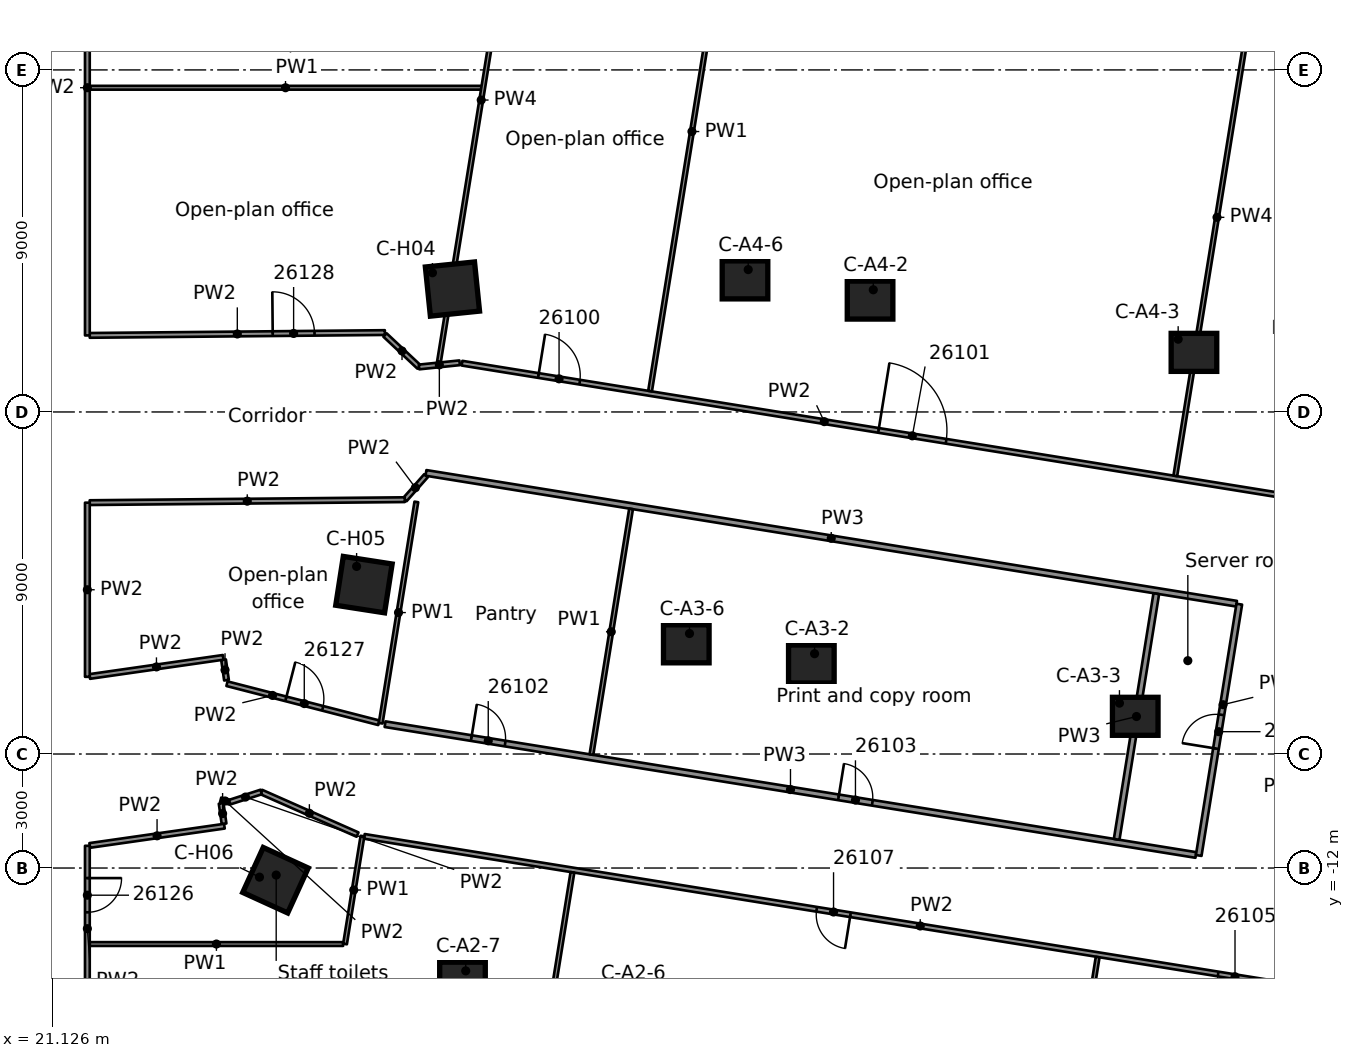
"""IFC4 building model, lengths in metres.
Left out: names, types, materials, properties, quantities, classifications, styles, units other than length and angle.
Written with IfcOpenShell. Run it as: python <this file> out.ifc"""

import sys

from ifc_helpers import new_model, si_unit, direction, frame, frame_2d, origin, origin_2d, place, context, subcontext, project, spatial, rectangle, extrude, element, fill, save


model = new_model("IFC4")
c1 = context("Model", 3, precision=1e-05, world=origin(), true_north=direction((0.0, 1.0)))
c2 = subcontext(c1, "Body", "Model", "MODEL_VIEW")
j1 = project(units=[si_unit("LENGTHUNIT", "METRE"), si_unit("PLANEANGLEUNIT", "RADIAN")], contexts=[c1])
p1 = place(None, origin())
s1 = spatial("IfcSite", under=j1, at=p1, CompositionType="ELEMENT")
p2 = place(p1, origin())
s2 = spatial("IfcBuilding", under=s1, at=p2, CompositionType="ELEMENT")
p3 = place(p2, frame((0.0, 0.0, 134.2)))
s3 = spatial("IfcBuildingStorey", under=s2, at=p3, CompositionType="ELEMENT", Elevation=134.2)
for number, where, z_axis, x_axis in (
    (1, (31.922, -14.977, 0.0), (0.0, 0.0, 1.0), (1.0, 0.0, 0.0)),
    (2, (41.102, -6.632, 0.0), (0.0, 0.0, 1.0), (1.0, 0.0, 0.0)),
    (3, (49.625, -8.008, 0.0), (0.0, 0.0, 1.0), (1.0, 0.0, 0.0)),
    (4, (37.811, -6.101, 0.0), (0.0, 0.0, 1.0), (1.0, 0.0, 0.0)),
    (5, (42.647, 2.944, 0.0), (0.0, 0.0, 1.0), (1.0, 0.0, 0.0)),
    (6, (51.17, 1.568, 0.0), (0.0, 0.0, 1.0), (1.0, 0.0, 0.0)),
    (7, (39.356, 3.475, 0.0), (0.0, 0.0, 1.0), (1.0, 0.0, 0.0)),
):
    element("IfcColumn", number, at=place(p3, frame(where, z_axis=z_axis, x_axis=x_axis)), inside=s3, PredefinedType="COLUMN", context=c2, shape_type="SweptSolid", body=[
        extrude(rectangle(XDim=1.2, YDim=1.0, at=origin_2d()), origin(), (0.0, 0.0, 1.0), 3.5),
    ])
for number, where, z_axis, x_axis in (
    (8, (31.658, 3.234, 0.0), (0.0, 0.0, 1.0), (0.995, 0.102, 0.0)),
    (9, (29.329, -4.543, 0.0), (0.0, 0.0, 1.0), (0.988, -0.153, 0.0)),
    (10, (27.001, -12.321, 0.0), (0.0, 0.0, 1.0), (0.91, -0.415, 0.0)),
):
    element("IfcColumn", number, at=place(p3, frame(where, z_axis=z_axis, x_axis=x_axis)), inside=s3, PredefinedType="COLUMN", context=c2, shape_type="SweptSolid", body=[
        extrude(rectangle(XDim=1.3, YDim=1.3, at=origin_2d()), origin(), (0.0, 0.0, 1.0), 3.5),
    ])
p4 = place(p3, frame((29.883, 2.025, 0.0), z_axis=(0.0, 0.0, 1.0), x_axis=(0.729202519841, -0.684297950499, 0.0)))
e11 = element("IfcWall", 11, at=p4, inside=s3, PredefinedType="PARTITIONING", context=c2, shape_type="SweptSolid", body=[
    extrude(rectangle(XDim=1.229, YDim=0.125, at=frame_2d((0.614, 0.0))), origin(), (0.0, 0.0, 1.0), 3.03),
])
p5 = place(p3, frame((30.962, -1.678, 0.0), z_axis=(0.0, 0.0, 1.0), x_axis=(-0.66286801914, -0.748736261444, 0.0)))
e12 = element("IfcWall", 12, at=p5, inside=s3, PredefinedType="PARTITIONING", context=c2, shape_type="SweptSolid", body=[
    extrude(rectangle(XDim=0.842, YDim=0.125, at=frame_2d((0.421, 0.0))), origin(), (0.0, 0.0, 1.0), 3.03),
])
for number, where, z_axis, x_axis in (
    (13, (25.571, -10.299, 0.0), (0.0, 0.0, 1.0), (0.142, -0.99, 0.0)),
    (14, (25.635, -6.52, 0.0), (0.0, 0.0, 1.0), (0.142, -0.99, 0.0)),
):
    element("IfcWall", number, at=place(p3, frame(where, z_axis=z_axis, x_axis=x_axis)), inside=s3, PredefinedType="PARTITIONING", context=c2, shape_type="SweptSolid", body=[
        extrude(rectangle(XDim=0.542, YDim=0.125, at=frame_2d((0.271, 0.0))), origin(), (0.0, 0.0, 1.0), 3.03),
    ])
p6 = place(p3, frame((26.626, -9.999, 0.0), z_axis=(0.0, 0.0, 1.0), x_axis=(0.914493335472, -0.404600963145, 0.0)))
e15 = element("IfcWall", 15, at=p6, inside=s3, PredefinedType="PARTITIONING", context=c2, shape_type="SweptSolid", body=[
    extrude(rectangle(XDim=2.771, YDim=0.125, at=frame_2d((1.385, 0.0))), origin(), (0.0, 0.0, 1.0), 3.03),
])
p7 = place(p3, frame((25.558, -10.206, 0.0), z_axis=(0.0, 0.0, 1.0), x_axis=(0.968355193071, -0.249576080688, 0.0)))
e16 = element("IfcWall", 16, at=p7, inside=s3, PredefinedType="PARTITIONING", context=c2, shape_type="SweptSolid", body=[
    extrude(rectangle(XDim=0.245, YDim=0.125, at=frame_2d((0.122, 0.0))), origin(), (0.0, 0.0, 1.0), 3.03),
])
p8 = place(p3, frame((25.725, -7.15, 0.0), z_axis=(0.0, 0.0, 1.0), x_axis=(0.968459487002, -0.249171069821, 0.0)))
e17 = element("IfcWall", 17, at=p8, inside=s3, PredefinedType="PARTITIONING", context=c2, shape_type="SweptSolid", body=[
    extrude(rectangle(XDim=4.126, YDim=0.125, at=frame_2d((2.063, 0.0))), origin(), (0.0, 0.0, 1.0), 3.03),
])
p9 = place(p8, frame((1.6, 0.0, 0.0)))
e18 = element("IfcOpeningElement", 18, at=p9, cuts=e17, PredefinedType="OPENING", context=c2, shape_type="SweptSolid", body=[
    extrude(rectangle(XDim=1.0, YDim=2.1, at=frame_2d((0.5, 1.05))), frame((0.0, 0.073, 0.0), z_axis=(0.0, -1.0, 0.0), x_axis=(1.0, 0.0, 0.0)), (0.0, 0.0, 1.0), 0.145),
])
p10 = place(p3, frame((53.72, -15.097, 0.0), z_axis=(0.0, 0.0, 1.0), x_axis=(-0.987256807208, 0.159135152063, 0.0)))
e19 = element("IfcWall", 19, at=p10, inside=s3, PredefinedType="PARTITIONING", context=c2, shape_type="SweptSolid", body=[
    extrude(rectangle(XDim=24.696, YDim=0.125, at=frame_2d((12.348, 0.0))), origin(), (0.0, 0.0, 1.0), 3.03),
])
p11 = place(p10, frame((1.039, 0.0, 0.0)))
e20 = element("IfcOpeningElement", 20, at=p11, cuts=e19, PredefinedType="OPENING", context=c2, shape_type="SweptSolid", body=[
    extrude(rectangle(XDim=0.9, YDim=2.1, at=frame_2d((0.45, 1.05))), frame((0.0, 0.073, 0.0), z_axis=(0.0, -1.0, 0.0), x_axis=(1.0, 0.0, 0.0)), (0.0, 0.0, 1.0), 0.145),
])
p12 = place(p10, frame((11.739, 0.0, 0.0)))
e21 = element("IfcOpeningElement", 21, at=p12, cuts=e19, PredefinedType="OPENING", context=c2, shape_type="SweptSolid", body=[
    extrude(rectangle(XDim=0.9, YDim=2.1, at=frame_2d((0.45, 1.05))), frame((0.0, 0.073, 0.0), z_axis=(0.0, -1.0, 0.0), x_axis=(1.0, 0.0, 0.0)), (0.0, 0.0, 1.0), 0.145),
])
p13 = place(p3, frame((29.885, -8.215, 0.0), z_axis=(0.0, 0.0, 1.0), x_axis=(0.987236652076, -0.1592601419, 0.0)))
e22 = element("IfcWall", 22, at=p13, inside=s3, PredefinedType="PARTITIONING", context=c2, shape_type="SweptSolid", body=[
    extrude(rectangle(XDim=21.612, YDim=0.15, at=frame_2d((10.806, 0.0))), origin(), (0.0, 0.0, 1.0), 3.03),
])
p14 = place(p13, frame((2.3, 0.0, 0.0)))
e23 = element("IfcOpeningElement", 23, at=p14, cuts=e22, PredefinedType="OPENING", context=c2, shape_type="SweptSolid", body=[
    extrude(rectangle(XDim=0.9, YDim=2.1, at=frame_2d((0.45, 1.05))), frame((0.0, 0.085, 0.0), z_axis=(0.0, -1.0, 0.0), x_axis=(1.0, 0.0, 0.0)), (0.0, 0.0, 1.0), 0.17),
])
p15 = place(p13, frame((12.088, 0.0, 0.0)))
e24 = element("IfcOpeningElement", 24, at=p15, cuts=e22, PredefinedType="OPENING", context=c2, shape_type="SweptSolid", body=[
    extrude(rectangle(XDim=0.9, YDim=2.1, at=frame_2d((0.45, 1.05))), frame((0.0, 0.085, 0.0), z_axis=(0.0, -1.0, 0.0), x_axis=(1.0, 0.0, 0.0)), (0.0, 0.0, 1.0), 0.17),
])
p16 = place(p3, frame((30.961, -1.603, 0.0), z_axis=(0.0, 0.0, 1.0), x_axis=(0.987228625593, -0.159309889241, 0.0)))
e25 = element("IfcWall", 25, at=p16, inside=s3, PredefinedType="PARTITIONING", context=c2, shape_type="SweptSolid", body=[
    extrude(rectangle(XDim=21.605, YDim=0.15, at=frame_2d((10.802, 0.0))), origin(), (0.0, 0.0, 1.0), 3.03),
])
p17 = place(p3, frame((31.909, 1.284, 0.0), z_axis=(0.0, 0.0, 1.0), x_axis=(0.987227629246, -0.159316063386, 0.0)))
e26 = element("IfcWall", 26, at=p17, inside=s3, PredefinedType="PARTITIONING", context=c2, shape_type="SweptSolid", body=[
    extrude(rectangle(XDim=24.14, YDim=0.125, at=frame_2d((12.07, 0.0))), origin(), (0.0, 0.0, 1.0), 3.03),
])
p18 = place(p17, frame((2.038, 0.0, 0.0)))
e27 = element("IfcOpeningElement", 27, at=p18, cuts=e26, PredefinedType="OPENING", context=c2, shape_type="SweptSolid", body=[
    extrude(rectangle(XDim=1.1, YDim=2.1, at=frame_2d((0.55, 1.05))), frame((0.0, 0.073, 0.0), z_axis=(0.0, -1.0, 0.0), x_axis=(1.0, 0.0, 0.0)), (0.0, 0.0, 1.0), 0.145),
])
p19 = place(p17, frame((11.103, 0.0, 0.0)))
e28 = element("IfcOpeningElement", 28, at=p19, cuts=e26, PredefinedType="OPENING", context=c2, shape_type="SweptSolid", body=[
    extrude(rectangle(XDim=1.8, YDim=2.1, at=frame_2d((0.9, 1.05))), frame((0.0, 0.073, 0.0), z_axis=(0.0, -1.0, 0.0), x_axis=(1.0, 0.0, 0.0)), (0.0, 0.0, 1.0), 0.145),
])
p20 = place(p17, frame((22.303, 0.0, 0.0)))
e29 = element("IfcOpeningElement", 29, at=p20, cuts=e26, PredefinedType="OPENING", context=c2, shape_type="SweptSolid", body=[
    extrude(rectangle(XDim=0.9, YDim=2.1, at=frame_2d((0.45, 1.05))), frame((0.0, 0.073, 0.0), z_axis=(0.0, -1.0, 0.0), x_axis=(1.0, 0.0, 0.0)), (0.0, 0.0, 1.0), 0.145),
])
p21 = place(p3, frame((22.113, -14.0, 0.0), z_axis=(0.0, 0.0, 1.0), x_axis=(1.0, 0.0, 0.0)))
e30 = element("IfcWall", 30, at=p21, inside=s3, PredefinedType="PARTITIONING", context=c2, shape_type="SweptSolid", body=[
    extrude(rectangle(XDim=6.668, YDim=0.1, at=frame_2d((3.334, 0.0))), origin(), (0.0, 0.0, 1.0), 3.03),
])
p22 = place(p3, frame((22.113, 8.531, 0.0), z_axis=(0.0, 0.0, 1.0), x_axis=(1.0, 0.0, 0.0)))
e31 = element("IfcWall", 31, at=p22, inside=s3, PredefinedType="PARTITIONING", context=c2, shape_type="SweptSolid", body=[
    extrude(rectangle(XDim=10.304, YDim=0.1, at=frame_2d((5.152, 0.0))), origin(), (0.0, 0.0, 1.0), 3.03),
])
p23 = place(p3, frame((22.113, -2.386, 0.0), z_axis=(0.0, 0.0, 1.0), x_axis=(0.9999558849, 0.009392989614, 0.0)))
e32 = element("IfcWall", 32, at=p23, inside=s3, PredefinedType="PARTITIONING", context=c2, shape_type="SweptSolid", body=[
    extrude(rectangle(XDim=8.291, YDim=0.125, at=frame_2d((4.146, 0.0))), origin(), (0.0, 0.0, 1.0), 3.03),
])
p24 = place(p3, frame((22.113, 2.015, 0.0), z_axis=(0.0, 0.0, 1.0), x_axis=(0.999954346069, 0.00955540569, 0.0)))
e33 = element("IfcWall", 33, at=p24, inside=s3, PredefinedType="PARTITIONING", context=c2, shape_type="SweptSolid", body=[
    extrude(rectangle(XDim=7.767, YDim=0.125, at=frame_2d((3.884, 0.0))), origin(), (0.0, 0.0, 1.0), 3.03),
])
p25 = place(p24, frame((4.816, 0.0, 0.0)))
e34 = element("IfcOpeningElement", 34, at=p25, cuts=e33, PredefinedType="OPENING", context=c2, shape_type="SweptSolid", body=[
    extrude(rectangle(XDim=1.1, YDim=2.1, at=frame_2d((0.55, 1.05))), frame((0.0, 0.073, 0.0), z_axis=(0.0, -1.0, 0.0), x_axis=(1.0, 0.0, 0.0)), (0.0, 0.0, 1.0), 0.145),
])
p26 = place(p3, frame((31.847, 1.294, 0.0), z_axis=(0.0, 0.0, 1.0), x_axis=(-0.994749429213, -0.102340476256, 0.0)))
e35 = element("IfcWall", 35, at=p26, inside=s3, PredefinedType="PARTITIONING", context=c2, shape_type="SweptSolid", body=[
    extrude(rectangle(XDim=1.073, YDim=0.125, at=frame_2d((0.537, 0.0))), origin(), (0.0, 0.0, 1.0), 3.03),
])
p27 = place(p3, frame((25.657, -10.899, 0.0), z_axis=(0.0, 0.0, 1.0), x_axis=(-0.989918099623, -0.141640940543, 0.0)))
e36 = element("IfcWall", 36, at=p27, inside=s3, PredefinedType="PARTITIONING", context=c2, shape_type="SweptSolid", body=[
    extrude(rectangle(XDim=3.58, YDim=0.125, at=frame_2d((1.79, 0.0))), origin(), (0.0, 0.0, 1.0), 3.03),
])
p28 = place(p3, frame((22.113, -6.96, 0.0), z_axis=(0.0, 0.0, 1.0), x_axis=(0.989901265857, 0.141758540679, 0.0)))
e37 = element("IfcWall", 37, at=p28, inside=s3, PredefinedType="PARTITIONING", context=c2, shape_type="SweptSolid", body=[
    extrude(rectangle(XDim=3.548, YDim=0.125, at=frame_2d((1.774, 0.0))), origin(), (0.0, 0.0, 1.0), 3.03),
])
p29 = place(p3, frame((25.796, -10.267, 0.0), z_axis=(0.0, 0.0, 1.0), x_axis=(0.951608325535, 0.307313512187, 0.0)))
e38 = element("IfcWall", 38, at=p29, inside=s3, PredefinedType="PARTITIONING", context=c2, shape_type="SweptSolid", body=[
    extrude(rectangle(XDim=0.872, YDim=0.125, at=frame_2d((0.436, 0.0))), origin(), (0.0, 0.0, 1.0), 3.03),
])
p30 = place(p3, frame((51.295, -11.67, 0.0), z_axis=(0.0, 0.0, 1.0), x_axis=(0.159450148398, 0.987205981635, 0.0)))
e39 = element("IfcWall", 39, at=p30, inside=s3, PredefinedType="PARTITIONING", context=c2, shape_type="SweptSolid", body=[
    extrude(rectangle(XDim=6.699, YDim=0.15, at=frame_2d((3.349, 0.0))), origin(), (0.0, 0.0, 1.0), 2.419),
])
p31 = place(p30, frame((2.85, 0.0, 0.0)))
e40 = element("IfcOpeningElement", 40, at=p31, cuts=e39, PredefinedType="OPENING", context=c2, shape_type="SweptSolid", body=[
    extrude(rectangle(XDim=0.9, YDim=2.1, at=frame_2d((0.45, 1.05))), frame((0.0, 0.085, 0.0), z_axis=(0.0, -1.0, 0.0), x_axis=(1.0, 0.0, 0.0)), (0.0, 0.0, 1.0), 0.17),
])
p32 = place(p3, frame((46.44, -27.951, 0.0), z_axis=(0.0, 0.0, 1.0), x_axis=(0.159329896372, 0.987225396818, 0.0)))
e41 = element("IfcWall", 41, at=p32, inside=s3, PredefinedType="PARTITIONING", context=c2, shape_type="SweptSolid", body=[
    extrude(rectangle(XDim=13.783, YDim=0.1, at=frame_2d((6.892, 0.0))), origin(), (0.0, 0.0, 1.0), 3.03),
])
p33 = place(p3, frame((49.136, -11.246, 0.0), z_axis=(0.0, 0.0, 1.0), x_axis=(0.159264085933, 0.98723601582, 0.0)))
e42 = element("IfcWall", 42, at=p33, inside=s3, PredefinedType="PARTITIONING", context=c2, shape_type="SweptSolid", body=[
    extrude(rectangle(XDim=6.549, YDim=0.15, at=frame_2d((3.274, 0.0))), origin(), (0.0, 0.0, 1.0), 3.03),
])
p34 = place(p3, frame((50.679, -1.682, 0.0), z_axis=(0.0, 0.0, 1.0), x_axis=(0.159341041875, 0.987223597963, 0.0)))
e43 = element("IfcWall", 43, at=p34, inside=s3, PredefinedType="PARTITIONING", context=c2, shape_type="SweptSolid", body=[
    extrude(rectangle(XDim=13.782, YDim=0.1, at=frame_2d((6.891, 0.0))), origin(), (0.0, 0.0, 1.0), 2.395),
])
p35 = place(p3, frame((32.61, -25.774, 0.0), z_axis=(0.0, 0.0, 1.0), x_axis=(0.159346714874, 0.987222682306, 0.0)))
e44 = element("IfcWall", 44, at=p35, inside=s3, PredefinedType="PARTITIONING", context=c2, shape_type="SweptSolid", body=[
    extrude(rectangle(XDim=13.837, YDim=0.1, at=frame_2d((6.918, 0.0))), origin(), (0.0, 0.0, 1.0), 3.03),
])
p36 = place(p3, frame((35.315, -9.015, 0.0), z_axis=(0.0, 0.0, 1.0), x_axis=(0.159269947871, 0.987235070135, 0.0)))
e45 = element("IfcWall", 45, at=p36, inside=s3, PredefinedType="PARTITIONING", context=c2, shape_type="SweptSolid", body=[
    extrude(rectangle(XDim=6.548, YDim=0.1, at=frame_2d((3.274, 0.0))), origin(), (0.0, 0.0, 1.0), 3.03),
])
p37 = place(p3, frame((36.858, 0.549, 0.0), z_axis=(0.0, 0.0, 1.0), x_axis=(0.159375015721, 0.987218113876, 0.0)))
e46 = element("IfcWall", 46, at=p37, inside=s3, PredefinedType="PARTITIONING", context=c2, shape_type="SweptSolid", body=[
    extrude(rectangle(XDim=13.836, YDim=0.1, at=frame_2d((6.918, 0.0))), origin(), (0.0, 0.0, 1.0), 3.03),
])
p38 = place(p3, frame((28.831, -13.999, 0.0), z_axis=(0.0, 0.0, 1.0), x_axis=(0.15953925726, 0.987191584948, 0.0)))
e47 = element("IfcWall", 47, at=p38, inside=s3, PredefinedType="PARTITIONING", context=c2, shape_type="SweptSolid", body=[
    extrude(rectangle(XDim=2.877, YDim=0.1, at=frame_2d((1.438, 0.0))), origin(), (0.0, 0.0, 1.0), 3.03),
])
p39 = place(p3, frame((29.769, -8.19, 0.0), z_axis=(0.0, 0.0, 1.0), x_axis=(0.159194698691, 0.987247207091, 0.0)))
e48 = element("IfcWall", 48, at=p39, inside=s3, PredefinedType="PARTITIONING", context=c2, shape_type="SweptSolid", body=[
    extrude(rectangle(XDim=5.898, YDim=0.1, at=frame_2d((2.949, 0.0))), origin(), (0.0, 0.0, 1.0), 3.03),
])
p40 = place(p3, frame((31.302, 1.314, 0.0), z_axis=(0.0, 0.0, 1.0), x_axis=(0.159396223654, 0.987214689865, 0.0)))
e49 = element("IfcWall", 49, at=p40, inside=s3, PredefinedType="PARTITIONING", context=c2, shape_type="SweptSolid", body=[
    extrude(rectangle(XDim=13.966, YDim=0.1, at=frame_2d((6.983, 0.0))), origin(), (0.0, 0.0, 1.0), 2.395),
])
p41 = place(p3, frame((22.051, -11.415, 0.0), z_axis=(0.0, 0.0, 1.0), x_axis=(0.0, -1.0, 0.0)))
e50 = element("IfcWall", 50, at=p41, inside=s3, PredefinedType="PARTITIONING", context=c2, shape_type="SweptSolid", body=[
    extrude(rectangle(XDim=3.634, YDim=0.125, at=frame_2d((1.817, 0.0))), origin(), (0.0, 0.0, 1.0), 3.03),
])
p42 = place(p41, frame((0.85, 0.0, 0.0)))
e51 = element("IfcOpeningElement", 51, at=p42, cuts=e50, PredefinedType="OPENING", context=c2, shape_type="SweptSolid", body=[
    extrude(rectangle(XDim=0.9, YDim=2.1, at=frame_2d((0.45, 1.05))), frame((0.0, 0.073, 0.0), z_axis=(0.0, -1.0, 0.0), x_axis=(1.0, 0.0, 0.0)), (0.0, 0.0, 1.0), 0.145),
])
p43 = place(p3, frame((22.051, -6.969, 0.0), z_axis=(0.0, 0.0, 1.0), x_axis=(0.0, 1.0, 0.0)))
e52 = element("IfcWall", 52, at=p43, inside=s3, PredefinedType="PARTITIONING", context=c2, shape_type="SweptSolid", body=[
    extrude(rectangle(XDim=4.582, YDim=0.125, at=frame_2d((2.291, 0.0))), origin(), (0.0, 0.0, 1.0), 3.03),
])
p44 = place(p3, frame((22.051, 15.05, 0.0), z_axis=(0.0, 0.0, 1.0), x_axis=(0.0, -1.0, 0.0)))
e53 = element("IfcWall", 53, at=p44, inside=s3, PredefinedType="PARTITIONING", context=c2, shape_type="SweptSolid", body=[
    extrude(rectangle(XDim=13.036, YDim=0.125, at=frame_2d((6.518, 0.0))), origin(), (0.0, 0.0, 1.0), 3.03),
])
p45 = place(p44, frame((2.35, 0.0, 0.0)))
e54 = element("IfcOpeningElement", 54, at=p45, cuts=e53, PredefinedType="OPENING", context=c2, shape_type="SweptSolid", body=[
    extrude(rectangle(XDim=1.8, YDim=2.1, at=frame_2d((0.9, 1.05))), frame((0.0, 0.073, 0.0), z_axis=(0.0, -1.0, 0.0), x_axis=(1.0, 0.0, 0.0)), (0.0, 0.0, 1.0), 0.145),
])
p46 = place(p18, origin())
e55 = element("IfcDoor", 55, at=p46, inside=s3, OperationType="SINGLE_SWING_LEFT", PredefinedType="DOOR", context=c2, shape_type="SweptSolid", body=[
    extrude(rectangle(XDim=1.1, YDim=2.1, at=frame_2d((0.55, 1.05))), frame((0.0, 0.025, 0.0), z_axis=(0.0, -1.0, 0.0), x_axis=(1.0, 0.0, 0.0)), (0.0, 0.0, 1.0), 0.05),
])
fill(e27, e55)
p47 = place(p19, origin())
e56 = element("IfcDoor", 56, at=p47, inside=s3, OperationType="DOUBLE_DOOR_SINGLE_SWING", PredefinedType="DOOR", context=c2, shape_type="SweptSolid", body=[
    extrude(rectangle(XDim=1.8, YDim=2.1, at=frame_2d((0.9, 1.05))), frame((0.0, 0.025, 0.0), z_axis=(0.0, -1.0, 0.0), x_axis=(1.0, 0.0, 0.0)), (0.0, 0.0, 1.0), 0.05),
])
fill(e28, e56)
p48 = place(p14, origin())
e57 = element("IfcDoor", 57, at=p48, inside=s3, OperationType="SINGLE_SWING_LEFT", PredefinedType="DOOR", context=c2, shape_type="SweptSolid", body=[
    extrude(rectangle(XDim=0.9, YDim=2.1, at=frame_2d((0.45, 1.05))), frame((0.0, 0.025, 0.0), z_axis=(0.0, -1.0, 0.0), x_axis=(1.0, 0.0, 0.0)), (0.0, 0.0, 1.0), 0.05),
])
fill(e23, e57)
p49 = place(p15, origin())
e58 = element("IfcDoor", 58, at=p49, inside=s3, OperationType="SINGLE_SWING_RIGHT", PredefinedType="DOOR", context=c2, shape_type="SweptSolid", body=[
    extrude(rectangle(XDim=0.9, YDim=2.1, at=frame_2d((0.45, 1.05))), frame((0.0, 0.025, 0.0), z_axis=(0.0, -1.0, 0.0), x_axis=(1.0, 0.0, 0.0)), (0.0, 0.0, 1.0), 0.05),
])
fill(e24, e58)
p50 = place(p31, origin())
e59 = element("IfcDoor", 59, at=p50, inside=s3, OperationType="SINGLE_SWING_LEFT", PredefinedType="DOOR", context=c2, shape_type="SweptSolid", body=[
    extrude(rectangle(XDim=0.9, YDim=2.1, at=frame_2d((0.45, 1.05))), frame((0.0, 0.025, 0.0), z_axis=(0.0, -1.0, 0.0), x_axis=(1.0, 0.0, 0.0)), (0.0, 0.0, 1.0), 0.05),
])
fill(e40, e59)
p51 = place(p11, origin())
e60 = element("IfcDoor", 60, at=p51, inside=s3, OperationType="SINGLE_SWING_LEFT", PredefinedType="DOOR", context=c2, shape_type="SweptSolid", body=[
    extrude(rectangle(XDim=0.9, YDim=2.1, at=frame_2d((0.45, 1.05))), frame((0.0, 0.025, 0.0), z_axis=(0.0, -1.0, 0.0), x_axis=(1.0, 0.0, 0.0)), (0.0, 0.0, 1.0), 0.05),
])
fill(e20, e60)
p52 = place(p12, origin())
e61 = element("IfcDoor", 61, at=p52, inside=s3, OperationType="SINGLE_SWING_LEFT", PredefinedType="DOOR", context=c2, shape_type="SweptSolid", body=[
    extrude(rectangle(XDim=0.9, YDim=2.1, at=frame_2d((0.45, 1.05))), frame((0.0, 0.025, 0.0), z_axis=(0.0, -1.0, 0.0), x_axis=(1.0, 0.0, 0.0)), (0.0, 0.0, 1.0), 0.05),
])
fill(e21, e61)
p53 = place(p42, origin())
e62 = element("IfcDoor", 62, at=p53, inside=s3, OperationType="SINGLE_SWING_LEFT", PredefinedType="DOOR", context=c2, shape_type="SweptSolid", body=[
    extrude(rectangle(XDim=0.9, YDim=2.1, at=frame_2d((0.45, 1.05))), frame((0.0, 0.025, 0.0), z_axis=(0.0, -1.0, 0.0), x_axis=(1.0, 0.0, 0.0)), (0.0, 0.0, 1.0), 0.05),
])
fill(e51, e62)
p54 = place(p9, origin())
e63 = element("IfcDoor", 63, at=p54, inside=s3, OperationType="SINGLE_SWING_RIGHT", PredefinedType="DOOR", context=c2, shape_type="SweptSolid", body=[
    extrude(rectangle(XDim=1.0, YDim=2.1, at=frame_2d((0.5, 1.05))), frame((0.0, 0.025, 0.0), z_axis=(0.0, -1.0, 0.0), x_axis=(1.0, 0.0, 0.0)), (0.0, 0.0, 1.0), 0.05),
])
fill(e18, e63)
p55 = place(p25, origin())
e64 = element("IfcDoor", 64, at=p55, inside=s3, OperationType="SINGLE_SWING_RIGHT", PredefinedType="DOOR", context=c2, shape_type="SweptSolid", body=[
    extrude(rectangle(XDim=1.1, YDim=2.1, at=frame_2d((0.55, 1.05))), frame((0.0, 0.025, 0.0), z_axis=(0.0, -1.0, 0.0), x_axis=(1.0, 0.0, 0.0)), (0.0, 0.0, 1.0), 0.05),
])
fill(e34, e64)
save(model, sys.argv[1])
